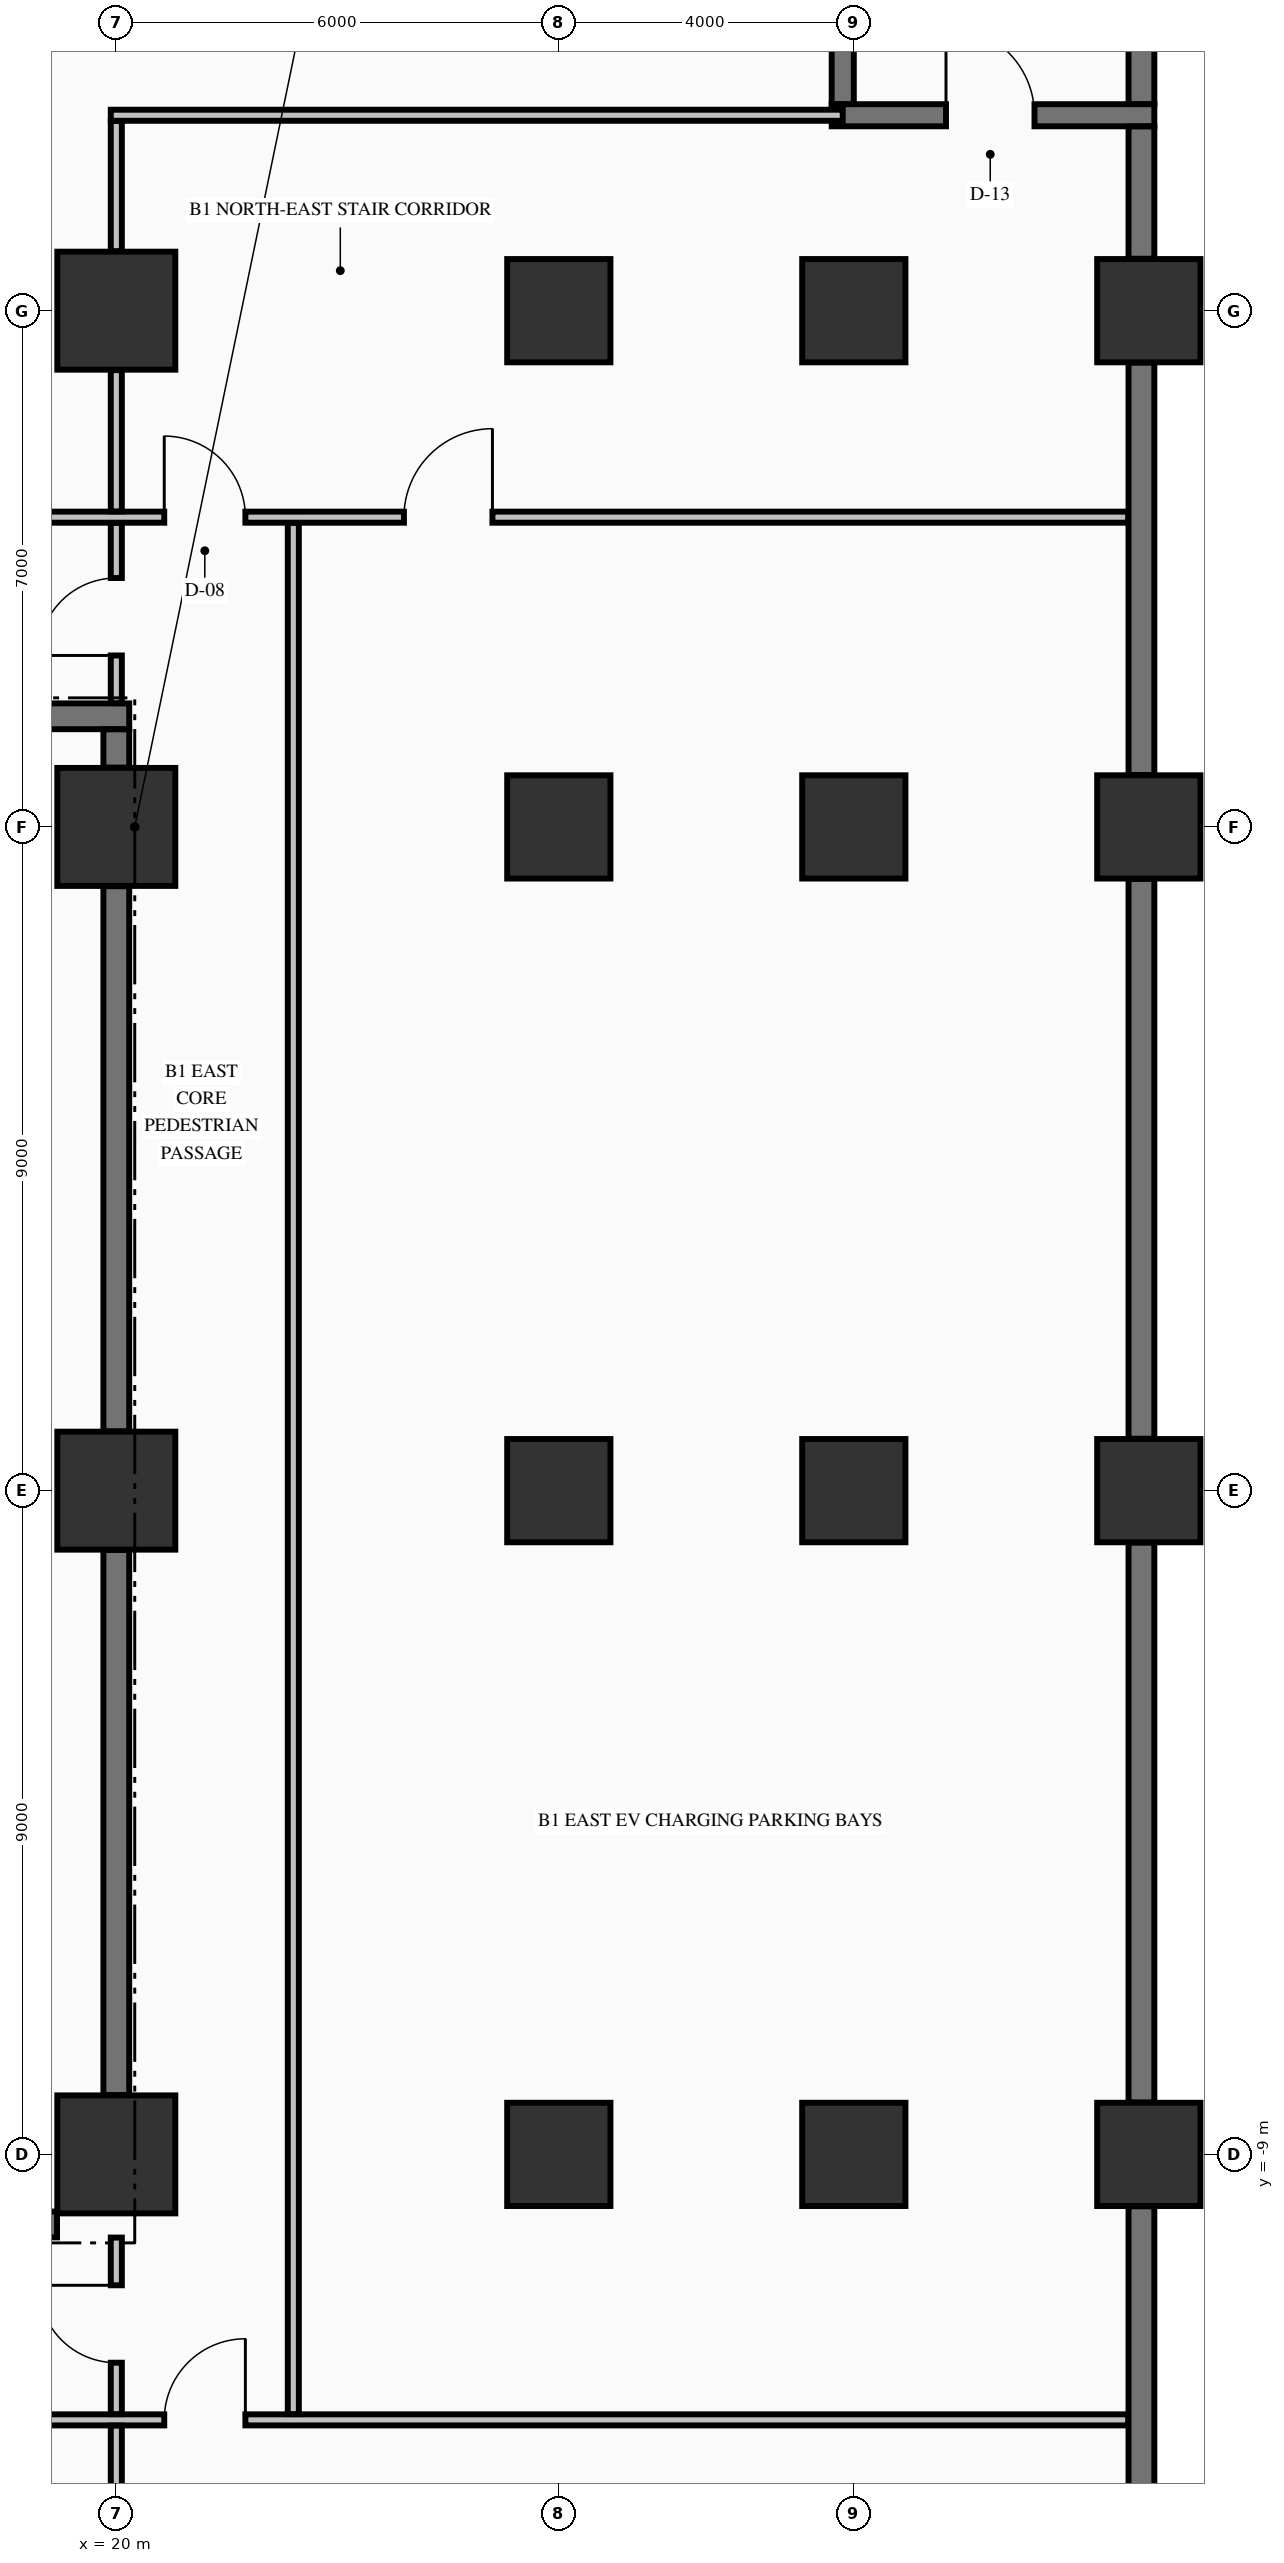
"""IFC4 building model, lengths in metres.
Left out: names, types, materials, properties, quantities, classifications, styles, units other than length and angle.
Written with IfcOpenShell. Run it as: python <this file> out.ifc"""

import sys

from ifc_helpers import new_model, si_unit, direction, frame, frame_2d, origin, origin_2d, place, context, subcontext, project, spatial, rectangle, extrude, element, fill, save


model = new_model("IFC4")
c1 = context("Model", 3, precision=1e-05, world=origin(), true_north=direction((0.0, 1.0)))
c2 = subcontext(c1, "Body", "Model", "MODEL_VIEW")
j1 = project(units=[si_unit("LENGTHUNIT", "METRE"), si_unit("PLANEANGLEUNIT", "RADIAN")], contexts=[c1])
p1 = place(None, origin())
s1 = spatial("IfcSite", under=j1, at=p1, CompositionType="ELEMENT")
p2 = place(p1, origin())
s2 = spatial("IfcBuilding", under=s1, at=p2, CompositionType="ELEMENT")
p3 = place(p2, frame((0.0, 0.0, -4.55)))
s3 = spatial("IfcBuildingStorey", under=s2, at=p3, CompositionType="ELEMENT", Elevation=-4.55)
for number, where, z_axis, x_axis in (
    (1, (20.0, -9.0, 0.0), (0.0, 0.0, 1.0), (1.0, 0.0, 0.0)),
    (2, (20.0, 0.0, 0.0), (0.0, 0.0, 1.0), (1.0, 0.0, 0.0)),
    (3, (20.0, 9.0, 0.0), (0.0, 0.0, 1.0), (1.0, 0.0, 0.0)),
    (4, (20.0, 16.0, 0.0), (0.0, 0.0, 1.0), (1.0, 0.0, 0.0)),
):
    element("IfcColumn", number, at=place(p3, frame(where, z_axis=z_axis, x_axis=x_axis)), inside=s3, PredefinedType="COLUMN", context=c2, shape_type="SweptSolid", body=[
        extrude(rectangle(XDim=1.6, YDim=1.6, at=origin_2d()), origin(), (0.0, 0.0, 1.0), 4.2),
    ])
for number, where, z_axis, x_axis in (
    (5, (26.0, -9.0, 0.0), (0.0, 0.0, 1.0), (1.0, 0.0, 0.0)),
    (6, (26.0, 0.0, 0.0), (0.0, 0.0, 1.0), (1.0, 0.0, 0.0)),
    (7, (26.0, 9.0, 0.0), (0.0, 0.0, 1.0), (1.0, 0.0, 0.0)),
    (8, (26.0, 16.0, 0.0), (0.0, 0.0, 1.0), (1.0, 0.0, 0.0)),
    (9, (30.0, -9.0, 0.0), (0.0, 0.0, 1.0), (1.0, 0.0, 0.0)),
    (10, (30.0, 0.0, 0.0), (0.0, 0.0, 1.0), (1.0, 0.0, 0.0)),
    (11, (30.0, 9.0, 0.0), (0.0, 0.0, 1.0), (1.0, 0.0, 0.0)),
    (12, (30.0, 16.0, 0.0), (0.0, 0.0, 1.0), (1.0, 0.0, 0.0)),
    (13, (34.0, -9.0, 0.0), (0.0, 0.0, 1.0), (1.0, 0.0, 0.0)),
    (14, (34.0, 0.0, 0.0), (0.0, 0.0, 1.0), (1.0, 0.0, 0.0)),
    (15, (34.0, 9.0, 0.0), (0.0, 0.0, 1.0), (1.0, 0.0, 0.0)),
    (16, (34.0, 16.0, 0.0), (0.0, 0.0, 1.0), (1.0, 0.0, 0.0)),
):
    element("IfcColumn", number, at=place(p3, frame(where, z_axis=z_axis, x_axis=x_axis)), inside=s3, PredefinedType="COLUMN", context=c2, shape_type="SweptSolid", body=[
        extrude(rectangle(XDim=1.4, YDim=1.4, at=origin_2d()), origin(), (0.0, 0.0, 1.0), 4.2),
    ])
p4 = place(p3, frame((14.7, -9.95, 0.0), z_axis=(0.0, 0.0, 1.0), x_axis=(1.0, 0.0, 0.0)))
e17 = element("IfcWall", 17, at=p4, inside=s3, PredefinedType="SHEAR", context=c2, shape_type="SweptSolid", body=[
    extrude(rectangle(XDim=4.496, YDim=0.35, at=frame_2d((2.248, 0.0))), origin(), (0.0, 0.0, 1.0), 4.2),
])
p5 = place(p3, frame((14.7, 10.5, 0.0), z_axis=(0.0, 0.0, 1.0), x_axis=(1.0, 0.0, 0.0)))
e18 = element("IfcWall", 18, at=p5, inside=s3, PredefinedType="SHEAR", context=c2, shape_type="SweptSolid", body=[
    extrude(rectangle(XDim=5.475, YDim=0.35, at=frame_2d((2.738, 0.0))), origin(), (0.0, 0.0, 1.0), 4.2),
])
p6 = place(p5, frame((2.1, 0.0, 0.0)))
e19 = element("IfcOpeningElement", 19, at=p6, cuts=e18, PredefinedType="OPENING", context=c2, shape_type="SweptSolid", body=[
    extrude(rectangle(XDim=1.1, YDim=2.15, at=frame_2d((0.55, 1.075))), frame((0.0, 0.185, 0.0), z_axis=(0.0, -1.0, 0.0), x_axis=(1.0, 0.0, 0.0)), (0.0, 0.0, 1.0), 0.37),
])
p7 = place(p3, frame((29.7, 18.65, 0.0), z_axis=(0.0, 0.0, 1.0), x_axis=(1.0, 0.0, 0.0)))
e20 = element("IfcWall", 20, at=p7, inside=s3, PredefinedType="SHEAR", context=c2, shape_type="SweptSolid", body=[
    extrude(rectangle(XDim=4.375, YDim=0.3, at=frame_2d((2.188, 0.0))), origin(), (0.0, 0.0, 1.0), 4.2),
])
p8 = place(p7, frame((1.55, 0.0, 0.0)))
e21 = element("IfcOpeningElement", 21, at=p8, cuts=e20, PredefinedType="OPENING", context=c2, shape_type="SweptSolid", body=[
    extrude(rectangle(XDim=1.2, YDim=2.15, at=frame_2d((0.6, 1.075))), frame((0.0, 0.16, 0.0), z_axis=(0.0, -1.0, 0.0), x_axis=(1.0, 0.0, 0.0)), (0.0, 0.0, 1.0), 0.32),
])
p9 = place(p3, frame((-33.722, -12.6, 0.0), z_axis=(0.0, 0.0, 1.0), x_axis=(1.0, 0.0, 0.0)))
e22 = element("IfcWall", 22, at=p9, inside=s3, PredefinedType="PARTITIONING", context=c2, shape_type="SweptSolid", body=[
    extrude(rectangle(XDim=67.444, YDim=0.15, at=frame_2d((33.722, 0.0))), origin(), (0.0, 0.0, 1.0), 3.74),
])
p10 = place(p9, frame((11.972, 0.0, 0.0)))
e23 = element("IfcOpeningElement", 23, at=p10, cuts=e22, PredefinedType="OPENING", context=c2, shape_type="SweptSolid", body=[
    extrude(rectangle(XDim=1.1, YDim=2.15, at=frame_2d((0.55, 1.075))), frame((0.0, 0.085, 0.0), z_axis=(0.0, -1.0, 0.0), x_axis=(1.0, 0.0, 0.0)), (0.0, 0.0, 1.0), 0.17),
])
p11 = place(p9, frame((54.372, 0.0, 0.0)))
e24 = element("IfcOpeningElement", 24, at=p11, cuts=e22, PredefinedType="OPENING", context=c2, shape_type="SweptSolid", body=[
    extrude(rectangle(XDim=1.1, YDim=2.15, at=frame_2d((0.55, 1.075))), frame((0.0, 0.085, 0.0), z_axis=(0.0, -1.0, 0.0), x_axis=(1.0, 0.0, 0.0)), (0.0, 0.0, 1.0), 0.17),
])
p12 = place(p9, frame((38.622, 0.0, 0.0)))
e25 = element("IfcOpeningElement", 25, at=p12, cuts=e22, PredefinedType="OPENING", context=c2, shape_type="SweptSolid", body=[
    extrude(rectangle(XDim=1.2, YDim=2.15, at=frame_2d((0.6, 1.075))), frame((0.0, 0.085, 0.0), z_axis=(0.0, -1.0, 0.0), x_axis=(1.0, 0.0, 0.0)), (0.0, 0.0, 1.0), 0.17),
])
p13 = place(p3, frame((-22.475, 13.2, 0.0), z_axis=(0.0, 0.0, 1.0), x_axis=(1.0, 0.0, 0.0)))
e26 = element("IfcWall", 26, at=p13, inside=s3, PredefinedType="PARTITIONING", context=c2, shape_type="SweptSolid", body=[
    extrude(rectangle(XDim=56.197, YDim=0.15, at=frame_2d((28.099, 0.0))), origin(), (0.0, 0.0, 1.0), 4.2),
])
p14 = place(p13, frame((43.125, 0.0, 0.0)))
e27 = element("IfcOpeningElement", 27, at=p14, cuts=e26, PredefinedType="OPENING", context=c2, shape_type="SweptSolid", body=[
    extrude(rectangle(XDim=1.1, YDim=2.15, at=frame_2d((0.55, 1.075))), frame((0.0, 0.085, 0.0), z_axis=(0.0, -1.0, 0.0), x_axis=(1.0, 0.0, 0.0)), (0.0, 0.0, 1.0), 0.17),
])
p15 = place(p13, frame((27.375, 0.0, 0.0)))
e28 = element("IfcOpeningElement", 28, at=p15, cuts=e26, PredefinedType="OPENING", context=c2, shape_type="SweptSolid", body=[
    extrude(rectangle(XDim=1.2, YDim=2.15, at=frame_2d((0.6, 1.075))), frame((0.0, 0.085, 0.0), z_axis=(0.0, -1.0, 0.0), x_axis=(1.0, 0.0, 0.0)), (0.0, 0.0, 1.0), 0.17),
])
p16 = place(p13, frame((46.375, 0.0, 0.0)))
e29 = element("IfcOpeningElement", 29, at=p16, cuts=e26, PredefinedType="OPENING", context=c2, shape_type="SweptSolid", body=[
    extrude(rectangle(XDim=1.2, YDim=2.15, at=frame_2d((0.6, 1.075))), frame((0.0, 0.085, 0.0), z_axis=(0.0, -1.0, 0.0), x_axis=(1.0, 0.0, 0.0)), (0.0, 0.0, 1.0), 0.17),
])
p17 = place(p13, frame((16.6, 0.0, 0.0)))
e30 = element("IfcOpeningElement", 30, at=p17, cuts=e26, PredefinedType="OPENING", context=c2, shape_type="SweptSolid", body=[
    extrude(rectangle(XDim=0.95, YDim=2.15, at=frame_2d((0.475, 1.075))), frame((0.0, 0.085, 0.0), z_axis=(0.0, -1.0, 0.0), x_axis=(1.0, 0.0, 0.0)), (0.0, 0.0, 1.0), 0.17),
])
p18 = place(p3, frame((19.925, 18.65, 0.0), z_axis=(0.0, 0.0, 1.0), x_axis=(1.0, 0.0, 0.0)))
e31 = element("IfcWall", 31, at=p18, inside=s3, PredefinedType="PARTITIONING", context=c2, shape_type="SweptSolid", body=[
    extrude(rectangle(XDim=9.925, YDim=0.15, at=frame_2d((4.962, 0.0))), origin(), (0.0, 0.0, 1.0), 4.2),
])
for number, where, z_axis, x_axis in (
    (32, (20.0, -8.196, 0.0), (0.0, 0.0, 1.0), (0.0, 1.0, 0.0)),
    (33, (20.0, 0.804, 0.0), (0.0, 0.0, 1.0), (0.0, 1.0, 0.0)),
):
    element("IfcWall", number, at=place(p3, frame(where, z_axis=z_axis, x_axis=x_axis)), inside=s3, PredefinedType="SHEAR", context=c2, shape_type="SweptSolid", body=[
        extrude(rectangle(XDim=7.392, YDim=0.35, at=frame_2d((3.696, 0.0))), origin(), (0.0, 0.0, 1.0), 4.2),
    ])
p19 = place(p3, frame((20.0, 9.804, 0.0), z_axis=(0.0, 0.0, 1.0), x_axis=(0.0, 1.0, 0.0)))
e34 = element("IfcWall", 34, at=p19, inside=s3, PredefinedType="SHEAR", context=c2, shape_type="SweptSolid", body=[
    extrude(rectangle(XDim=0.519, YDim=0.35, at=frame_2d((0.26, 0.0))), origin(), (0.0, 0.0, 1.0), 4.2),
])
p20 = place(p3, frame((29.85, 18.802, 0.0), z_axis=(0.0, 0.0, 1.0), x_axis=(0.0, 1.0, 0.0)))
e35 = element("IfcWall", 35, at=p20, inside=s3, PredefinedType="SHEAR", context=c2, shape_type="SweptSolid", body=[
    extrude(rectangle(XDim=9.494, YDim=0.3, at=frame_2d((4.747, 0.0))), origin(), (0.0, 0.0, 1.0), 4.2),
])
p21 = place(p3, frame((33.9, -15.296, 0.0), z_axis=(0.0, 0.0, 1.0), x_axis=(0.0, 1.0, 0.0)))
e36 = element("IfcWall", 36, at=p21, inside=s3, PredefinedType="SHEAR", context=c2, shape_type="SweptSolid", body=[
    extrude(rectangle(XDim=5.592, YDim=0.35, at=frame_2d((2.796, 0.0))), origin(), (0.0, 0.0, 1.0), 4.2),
])
for number, where, z_axis, x_axis in (
    (37, (33.9, -8.296, 0.0), (0.0, 0.0, 1.0), (0.0, 1.0, 0.0)),
    (38, (33.9, 0.704, 0.0), (0.0, 0.0, 1.0), (0.0, 1.0, 0.0)),
):
    element("IfcWall", number, at=place(p3, frame(where, z_axis=z_axis, x_axis=x_axis)), inside=s3, PredefinedType="SHEAR", context=c2, shape_type="SweptSolid", body=[
        extrude(rectangle(XDim=7.592, YDim=0.35, at=frame_2d((3.796, 0.0))), origin(), (0.0, 0.0, 1.0), 4.2),
    ])
p22 = place(p3, frame((33.9, 9.704, 0.0), z_axis=(0.0, 0.0, 1.0), x_axis=(0.0, 1.0, 0.0)))
e39 = element("IfcWall", 39, at=p22, inside=s3, PredefinedType="SHEAR", context=c2, shape_type="SweptSolid", body=[
    extrude(rectangle(XDim=5.592, YDim=0.35, at=frame_2d((2.796, 0.0))), origin(), (0.0, 0.0, 1.0), 4.2),
])
p23 = place(p3, frame((33.9, 16.704, 0.0), z_axis=(0.0, 0.0, 1.0), x_axis=(0.0, 1.0, 0.0)))
e40 = element("IfcWall", 40, at=p23, inside=s3, PredefinedType="SHEAR", context=c2, shape_type="SweptSolid", body=[
    extrude(rectangle(XDim=1.794, YDim=0.35, at=frame_2d((0.897, 0.0))), origin(), (0.0, 0.0, 1.0), 4.2),
])
p24 = place(p3, frame((33.9, 18.802, 0.0), z_axis=(0.0, 0.0, 1.0), x_axis=(0.0, 1.0, 0.0)))
e41 = element("IfcWall", 41, at=p24, inside=s3, PredefinedType="SHEAR", context=c2, shape_type="SweptSolid", body=[
    extrude(rectangle(XDim=2.494, YDim=0.35, at=frame_2d((1.247, 0.0))), origin(), (0.0, 0.0, 1.0), 4.2),
])
p25 = place(p3, frame((20.0, -15.194, 0.0), z_axis=(0.0, 0.0, 1.0), x_axis=(0.0, 1.0, 0.0)))
e42 = element("IfcWall", 42, at=p25, inside=s3, PredefinedType="PARTITIONING", context=c2, shape_type="SweptSolid", body=[
    extrude(rectangle(XDim=2.516, YDim=0.15, at=frame_2d((1.258, 0.0))), origin(), (0.0, 0.0, 1.0), 3.242),
])
p26 = place(p3, frame((20.0, -12.522, 0.0), z_axis=(0.0, 0.0, 1.0), x_axis=(0.0, 1.0, 0.0)))
e43 = element("IfcWall", 43, at=p26, inside=s3, PredefinedType="PARTITIONING", context=c2, shape_type="SweptSolid", body=[
    extrude(rectangle(XDim=2.394, YDim=0.15, at=frame_2d((1.197, 0.0))), origin(), (0.0, 0.0, 1.0), 3.242),
])
p27 = place(p26, frame((0.697, 0.0, 0.0)))
e44 = element("IfcOpeningElement", 44, at=p27, cuts=e43, PredefinedType="OPENING", context=c2, shape_type="SweptSolid", body=[
    extrude(rectangle(XDim=1.05, YDim=2.15, at=frame_2d((0.525, 1.075))), frame((0.0, 0.085, 0.0), z_axis=(0.0, -1.0, 0.0), x_axis=(1.0, 0.0, 0.0)), (0.0, 0.0, 1.0), 0.17),
])
p28 = place(p3, frame((20.0, 10.678, 0.0), z_axis=(0.0, 0.0, 1.0), x_axis=(0.0, 1.0, 0.0)))
e45 = element("IfcWall", 45, at=p28, inside=s3, PredefinedType="PARTITIONING", context=c2, shape_type="SweptSolid", body=[
    extrude(rectangle(XDim=2.444, YDim=0.15, at=frame_2d((1.222, 0.0))), origin(), (0.0, 0.0, 1.0), 3.242),
])
p29 = place(p28, frame((0.647, 0.0, 0.0)))
e46 = element("IfcOpeningElement", 46, at=p29, cuts=e45, PredefinedType="OPENING", context=c2, shape_type="SweptSolid", body=[
    extrude(rectangle(XDim=1.05, YDim=2.15, at=frame_2d((0.525, 1.075))), frame((0.0, 0.085, 0.0), z_axis=(0.0, -1.0, 0.0), x_axis=(1.0, 0.0, 0.0)), (0.0, 0.0, 1.0), 0.17),
])
p30 = place(p3, frame((20.0, 13.278, 0.0), z_axis=(0.0, 0.0, 1.0), x_axis=(0.0, 1.0, 0.0)))
e47 = element("IfcWall", 47, at=p30, inside=s3, PredefinedType="PARTITIONING", context=c2, shape_type="SweptSolid", body=[
    extrude(rectangle(XDim=1.916, YDim=0.15, at=frame_2d((0.958, 0.0))), origin(), (0.0, 0.0, 1.0), 3.242),
])
p31 = place(p3, frame((20.0, 16.806, 0.0), z_axis=(0.0, 0.0, 1.0), x_axis=(0.0, 1.0, 0.0)))
e48 = element("IfcWall", 48, at=p31, inside=s3, PredefinedType="PARTITIONING", context=c2, shape_type="SweptSolid", body=[
    extrude(rectangle(XDim=1.766, YDim=0.15, at=frame_2d((0.883, 0.0))), origin(), (0.0, 0.0, 1.0), 3.242),
])
p32 = place(p3, frame((22.4, -12.522, 0.0), z_axis=(0.0, 0.0, 1.0), x_axis=(0.0, 1.0, 0.0)))
e49 = element("IfcWall", 49, at=p32, inside=s3, PredefinedType="PARTITIONING", context=c2, shape_type="SweptSolid", body=[
    extrude(rectangle(XDim=25.644, YDim=0.15, at=frame_2d((12.822, 0.0))), origin(), (0.0, 0.0, 1.0), 4.2),
])
p33 = place(p8, origin())
e50 = element("IfcDoor", 50, at=p33, inside=s3, OperationType="SINGLE_SWING_LEFT", PredefinedType="DOOR", context=c2, shape_type="SweptSolid", body=[
    extrude(rectangle(XDim=1.2, YDim=2.15, at=frame_2d((0.6, 1.075))), frame((0.0, 0.025, 0.0), z_axis=(0.0, -1.0, 0.0), x_axis=(1.0, 0.0, 0.0)), (0.0, 0.0, 1.0), 0.05),
])
fill(e21, e50)
p34 = place(p29, origin())
e51 = element("IfcDoor", 51, at=p34, inside=s3, OperationType="SINGLE_SWING_LEFT", PredefinedType="DOOR", context=c2, shape_type="SweptSolid", body=[
    extrude(rectangle(XDim=1.05, YDim=2.15, at=frame_2d((0.525, 1.075))), frame((0.0, 0.025, 0.0), z_axis=(0.0, -1.0, 0.0), x_axis=(1.0, 0.0, 0.0)), (0.0, 0.0, 1.0), 0.05),
])
fill(e46, e51)
p35 = place(p27, origin())
e52 = element("IfcDoor", 52, at=p35, inside=s3, OperationType="SINGLE_SWING_RIGHT", PredefinedType="DOOR", context=c2, shape_type="SweptSolid", body=[
    extrude(rectangle(XDim=1.05, YDim=2.15, at=frame_2d((0.525, 1.075))), frame((0.0, 0.025, 0.0), z_axis=(0.0, -1.0, 0.0), x_axis=(1.0, 0.0, 0.0)), (0.0, 0.0, 1.0), 0.05),
])
fill(e44, e52)
p36 = place(p14, origin())
e53 = element("IfcDoor", 53, at=p36, inside=s3, OperationType="SINGLE_SWING_LEFT", PredefinedType="DOOR", context=c2, shape_type="SweptSolid", body=[
    extrude(rectangle(XDim=1.1, YDim=2.15, at=frame_2d((0.55, 1.075))), frame((0.0, 0.025, 0.0), z_axis=(0.0, -1.0, 0.0), x_axis=(1.0, 0.0, 0.0)), (0.0, 0.0, 1.0), 0.05),
])
fill(e27, e53)
p37 = place(p11, origin())
e54 = element("IfcDoor", 54, at=p37, inside=s3, OperationType="SINGLE_SWING_RIGHT", PredefinedType="DOOR", context=c2, shape_type="SweptSolid", body=[
    extrude(rectangle(XDim=1.1, YDim=2.15, at=frame_2d((0.55, 1.075))), frame((0.0, 0.025, 0.0), z_axis=(0.0, -1.0, 0.0), x_axis=(1.0, 0.0, 0.0)), (0.0, 0.0, 1.0), 0.05),
])
fill(e24, e54)
p38 = place(p16, origin())
e55 = element("IfcDoor", 55, at=p38, inside=s3, OperationType="SINGLE_SWING_RIGHT", PredefinedType="DOOR", context=c2, shape_type="SweptSolid", body=[
    extrude(rectangle(XDim=1.2, YDim=2.15, at=frame_2d((0.6, 1.075))), frame((0.0, 0.025, 0.0), z_axis=(0.0, -1.0, 0.0), x_axis=(1.0, 0.0, 0.0)), (0.0, 0.0, 1.0), 0.05),
])
fill(e29, e55)
save(model, sys.argv[1])
